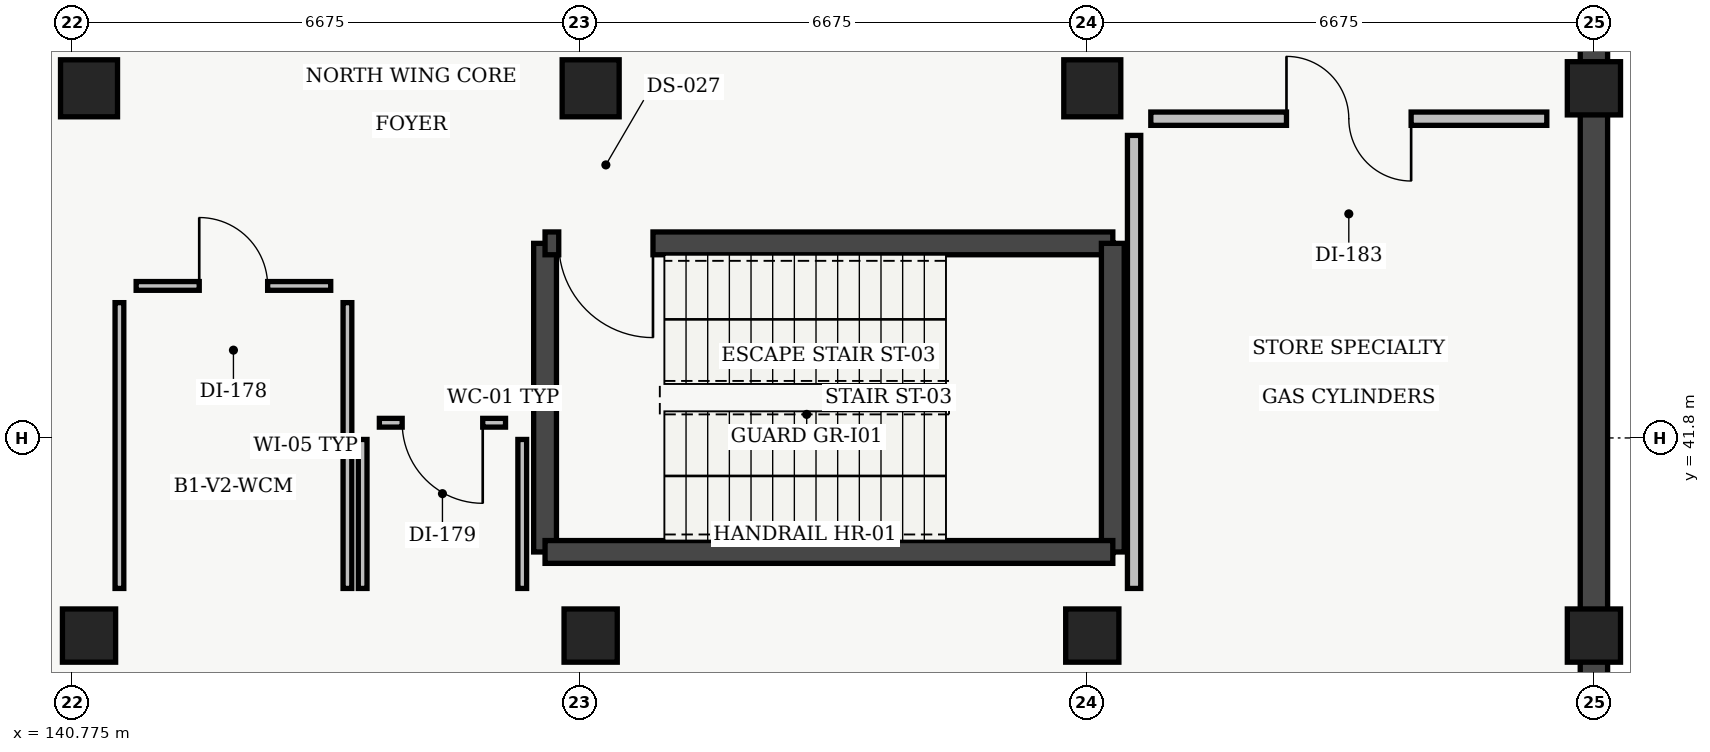
"""IFC4 building model, lengths in metres.
Left out: names, types, materials, properties, quantities, classifications, styles, units other than length and angle.
Written with IfcOpenShell. Run it as: python <this file> out.ifc"""

import sys

from ifc_helpers import new_model, si_unit, direction, frame, frame_2d, origin, origin_2d, place, context, subcontext, project, spatial, rectangle, extrude, element, fill, save


model = new_model("IFC4")
c1 = context("Model", 3, precision=1e-05, world=origin(), true_north=direction((0.0, 1.0)))
c2 = subcontext(c1, "Body", "Model", "MODEL_VIEW")
j1 = project(units=[si_unit("LENGTHUNIT", "METRE"), si_unit("PLANEANGLEUNIT", "RADIAN")], contexts=[c1])
p1 = place(None, origin())
s1 = spatial("IfcSite", under=j1, at=p1, CompositionType="ELEMENT")
p2 = place(p1, origin())
s2 = spatial("IfcBuilding", under=s1, at=p2, CompositionType="ELEMENT")
p3 = place(p2, frame((0.0, 0.0, -4.8)))
s3 = spatial("IfcBuildingStorey", under=s2, at=p3, CompositionType="ELEMENT", Elevation=-4.8)
p4 = place(p3, frame((141.0, 39.2, 0.0), z_axis=(0.0, 0.0, 1.0), x_axis=(1.0, 0.0, 0.0)))
e1 = element("IfcColumn", 1, at=p4, inside=s3, PredefinedType="COLUMN", context=c2, shape_type="SweptSolid", body=[
    extrude(rectangle(XDim=0.7, YDim=0.7, at=origin_2d()), origin(), (0.0, 0.0, 1.0), 4.59),
])
p5 = place(p3, frame((141.0, 46.4, 0.0), z_axis=(0.0, 0.0, 1.0), x_axis=(1.0, 0.0, 0.0)))
e2 = element("IfcColumn", 2, at=p5, inside=s3, PredefinedType="COLUMN", context=c2, shape_type="SweptSolid", body=[
    extrude(rectangle(XDim=0.75, YDim=0.75, at=origin_2d()), origin(), (0.0, 0.0, 1.0), 4.59),
])
p6 = place(p3, frame((147.6, 39.2, 0.0), z_axis=(0.0, 0.0, 1.0), x_axis=(1.0, 0.0, 0.0)))
e3 = element("IfcColumn", 3, at=p6, inside=s3, PredefinedType="COLUMN", context=c2, shape_type="SweptSolid", body=[
    extrude(rectangle(XDim=0.7, YDim=0.7, at=origin_2d()), origin(), (0.0, 0.0, 1.0), 4.59),
])
p7 = place(p3, frame((147.6, 46.4, 0.0), z_axis=(0.0, 0.0, 1.0), x_axis=(1.0, 0.0, 0.0)))
e4 = element("IfcColumn", 4, at=p7, inside=s3, PredefinedType="COLUMN", context=c2, shape_type="SweptSolid", body=[
    extrude(rectangle(XDim=0.75, YDim=0.75, at=origin_2d()), origin(), (0.0, 0.0, 1.0), 4.59),
])
p8 = place(p3, frame((154.2, 39.2, 0.0), z_axis=(0.0, 0.0, 1.0), x_axis=(1.0, 0.0, 0.0)))
e5 = element("IfcColumn", 5, at=p8, inside=s3, PredefinedType="COLUMN", context=c2, shape_type="SweptSolid", body=[
    extrude(rectangle(XDim=0.7, YDim=0.7, at=origin_2d()), origin(), (0.0, 0.0, 1.0), 4.59),
])
p9 = place(p3, frame((154.2, 46.4, 0.0), z_axis=(0.0, 0.0, 1.0), x_axis=(1.0, 0.0, 0.0)))
e6 = element("IfcColumn", 6, at=p9, inside=s3, PredefinedType="COLUMN", context=c2, shape_type="SweptSolid", body=[
    extrude(rectangle(XDim=0.75, YDim=0.75, at=origin_2d()), origin(), (0.0, 0.0, 1.0), 4.59),
])
for number, where, z_axis, x_axis in (
    (7, (160.8, 39.2, 0.0), (0.0, 0.0, 1.0), (1.0, 0.0, 0.0)),
    (8, (160.8, 46.4, 0.0), (0.0, 0.0, 1.0), (1.0, 0.0, 0.0)),
):
    element("IfcColumn", number, at=place(p3, frame(where, z_axis=z_axis, x_axis=x_axis)), inside=s3, PredefinedType="COLUMN", context=c2, shape_type="SweptSolid", body=[
        extrude(rectangle(XDim=0.7, YDim=0.7, at=origin_2d()), origin(), (0.0, 0.0, 1.0), 4.59),
    ])
p10 = place(p3, frame((160.8, 61.6, 0.0), z_axis=(0.0, 0.0, 1.0), x_axis=(0.0, -1.0, 0.0)))
e9 = element("IfcWall", 9, at=p10, inside=s3, PredefinedType="USERDEFINED", context=c2, shape_type="SweptSolid", body=[
    extrude(rectangle(XDim=61.4, YDim=0.36, at=frame_2d((30.7, 0.0))), origin(), (0.0, 0.0, 1.0), 4.58),
])
p11 = place(p3, frame((147.0, 40.3, 0.0), z_axis=(0.0, 0.0, 1.0), x_axis=(0.0, 1.0, 0.0)))
e10 = element("IfcWall", 10, at=p11, inside=s3, PredefinedType="SHEAR", context=c2, shape_type="SweptSolid", body=[
    extrude(rectangle(XDim=4.06, YDim=0.3, at=frame_2d((2.03, 0.0))), origin(), (0.0, 0.0, 1.0), 4.58),
])
p12 = place(p3, frame((147.0, 44.36, 0.0), z_axis=(0.0, 0.0, 1.0), x_axis=(1.0, 0.0, 0.0)))
e11 = element("IfcWall", 11, at=p12, inside=s3, PredefinedType="SHEAR", context=c2, shape_type="SweptSolid", body=[
    extrude(rectangle(XDim=7.47, YDim=0.3, at=frame_2d((3.735, 0.0))), origin(), (0.0, 0.0, 1.0), 4.58),
])
p13 = place(p12, frame((0.18, 0.0, 0.0)))
e12 = element("IfcOpeningElement", 12, at=p13, cuts=e11, PredefinedType="OPENING", context=c2, shape_type="SweptSolid", body=[
    extrude(rectangle(XDim=1.24, YDim=2.15, at=frame_2d((0.62, 1.075))), frame((0.0, 0.15, 0.0), z_axis=(0.0, -1.0, 0.0), x_axis=(1.0, 0.0, 0.0)), (0.0, 0.0, 1.0), 0.3),
])
p14 = place(p3, frame((154.47, 44.36, 0.0), z_axis=(0.0, 0.0, 1.0), x_axis=(0.0, -1.0, 0.0)))
e13 = element("IfcWall", 13, at=p14, inside=s3, PredefinedType="SHEAR", context=c2, shape_type="SweptSolid", body=[
    extrude(rectangle(XDim=4.06, YDim=0.3, at=frame_2d((2.03, 0.0))), origin(), (0.0, 0.0, 1.0), 4.58),
])
p15 = place(p3, frame((154.47, 40.3, 0.0), z_axis=(0.0, 0.0, 1.0), x_axis=(-1.0, 0.0, 0.0)))
e14 = element("IfcWall", 14, at=p15, inside=s3, PredefinedType="SHEAR", context=c2, shape_type="SweptSolid", body=[
    extrude(rectangle(XDim=7.47, YDim=0.3, at=frame_2d((3.735, 0.0))), origin(), (0.0, 0.0, 1.0), 4.58),
])
p16 = place(p3, frame((144.4, 39.82, 0.0), z_axis=(0.0, 0.0, 1.0), x_axis=(0.0, 1.0, 0.0)))
e15 = element("IfcWall", 15, at=p16, inside=s3, PredefinedType="PARTITIONING", context=c2, shape_type="SweptSolid", body=[
    extrude(rectangle(XDim=3.76, YDim=0.115, at=frame_2d((1.88, 0.0))), origin(), (0.0, 0.0, 1.0), 4.25),
])
p17 = place(p3, frame((144.18, 43.8, 0.0), z_axis=(0.0, 0.0, 1.0), x_axis=(-1.0, 0.0, 0.0)))
e16 = element("IfcWall", 16, at=p17, inside=s3, PredefinedType="PARTITIONING", context=c2, shape_type="SweptSolid", body=[
    extrude(rectangle(XDim=2.56, YDim=0.115, at=frame_2d((1.28, 0.0))), origin(), (0.0, 0.0, 1.0), 4.25),
])
p18 = place(p17, frame((0.83, 0.0, 0.0)))
e17 = element("IfcOpeningElement", 17, at=p18, cuts=e16, PredefinedType="OPENING", context=c2, shape_type="SweptSolid", body=[
    extrude(rectangle(XDim=0.9, YDim=2.1, at=frame_2d((0.45, 1.05))), frame((0.0, 0.058, 0.0), z_axis=(0.0, -1.0, 0.0), x_axis=(1.0, 0.0, 0.0)), (0.0, 0.0, 1.0), 0.115),
])
p19 = place(p3, frame((141.4, 43.58, 0.0), z_axis=(0.0, 0.0, 1.0), x_axis=(0.0, -1.0, 0.0)))
e18 = element("IfcWall", 18, at=p19, inside=s3, PredefinedType="PARTITIONING", context=c2, shape_type="SweptSolid", body=[
    extrude(rectangle(XDim=3.76, YDim=0.115, at=frame_2d((1.88, 0.0))), origin(), (0.0, 0.0, 1.0), 4.25),
])
p20 = place(p3, frame((146.7, 39.82, 0.0), z_axis=(0.0, 0.0, 1.0), x_axis=(0.0, 1.0, 0.0)))
e19 = element("IfcWall", 19, at=p20, inside=s3, PredefinedType="PARTITIONING", context=c2, shape_type="SweptSolid", body=[
    extrude(rectangle(XDim=1.96, YDim=0.115, at=frame_2d((0.98, 0.0))), origin(), (0.0, 0.0, 1.0), 4.25),
])
p21 = place(p3, frame((146.48, 42.0, 0.0), z_axis=(0.0, 0.0, 1.0), x_axis=(-1.0, 0.0, 0.0)))
e20 = element("IfcWall", 20, at=p21, inside=s3, PredefinedType="PARTITIONING", context=c2, shape_type="SweptSolid", body=[
    extrude(rectangle(XDim=1.66, YDim=0.115, at=frame_2d((0.83, 0.0))), origin(), (0.0, 0.0, 1.0), 4.25),
])
p22 = place(p21, frame((0.3, 0.0, 0.0)))
e21 = element("IfcOpeningElement", 21, at=p22, cuts=e20, PredefinedType="OPENING", context=c2, shape_type="SweptSolid", body=[
    extrude(rectangle(XDim=1.06, YDim=2.12, at=frame_2d((0.53, 1.06))), frame((0.0, 0.058, 0.0), z_axis=(0.0, -1.0, 0.0), x_axis=(1.0, 0.0, 0.0)), (0.0, 0.0, 1.0), 0.115),
])
p23 = place(p3, frame((144.6, 41.78, 0.0), z_axis=(0.0, 0.0, 1.0), x_axis=(0.0, -1.0, 0.0)))
e22 = element("IfcWall", 22, at=p23, inside=s3, PredefinedType="PARTITIONING", context=c2, shape_type="SweptSolid", body=[
    extrude(rectangle(XDim=1.96, YDim=0.115, at=frame_2d((0.98, 0.0))), origin(), (0.0, 0.0, 1.0), 4.25),
])
p24 = place(p3, frame((160.18, 46.0, 0.0), z_axis=(0.0, 0.0, 1.0), x_axis=(-1.0, 0.0, 0.0)))
e23 = element("IfcWall", 23, at=p24, inside=s3, PredefinedType="SOLIDWALL", context=c2, shape_type="SweptSolid", body=[
    extrude(rectangle(XDim=5.21, YDim=0.175, at=frame_2d((2.605, 0.0))), origin(), (0.0, 0.0, 1.0), 4.25),
])
p25 = place(p24, frame((1.785, 0.0, 0.0)))
e24 = element("IfcOpeningElement", 24, at=p25, cuts=e23, PredefinedType="OPENING", context=c2, shape_type="SweptSolid", body=[
    extrude(rectangle(XDim=1.64, YDim=2.2, at=frame_2d((0.82, 1.1))), frame((0.0, 0.087, 0.0), z_axis=(0.0, -1.0, 0.0), x_axis=(1.0, 0.0, 0.0)), (0.0, 0.0, 1.0), 0.175),
])
p26 = place(p3, frame((154.75, 45.78, 0.0), z_axis=(0.0, 0.0, 1.0), x_axis=(0.0, -1.0, 0.0)))
e25 = element("IfcWall", 25, at=p26, inside=s3, PredefinedType="SOLIDWALL", context=c2, shape_type="SweptSolid", body=[
    extrude(rectangle(XDim=5.96, YDim=0.175, at=frame_2d((2.98, 0.0))), origin(), (0.0, 0.0, 1.0), 4.25),
])
p27 = place(p13, origin())
e26 = element("IfcDoor", 26, at=p27, inside=s3, OperationType="SINGLE_SWING_RIGHT", PredefinedType="DOOR", context=c2, shape_type="SweptSolid", body=[
    extrude(rectangle(XDim=1.24, YDim=2.15, at=frame_2d((0.62, 1.075))), frame((0.0, 0.025, 0.0), z_axis=(0.0, -1.0, 0.0), x_axis=(1.0, 0.0, 0.0)), (0.0, 0.0, 1.0), 0.05),
])
fill(e12, e26)
p28 = place(p18, origin())
e27 = element("IfcDoor", 27, at=p28, inside=s3, OperationType="SINGLE_SWING_RIGHT", PredefinedType="DOOR", context=c2, shape_type="SweptSolid", body=[
    extrude(rectangle(XDim=0.9, YDim=2.1, at=frame_2d((0.45, 1.05))), frame((0.0, 0.025, 0.0), z_axis=(0.0, -1.0, 0.0), x_axis=(1.0, 0.0, 0.0)), (0.0, 0.0, 1.0), 0.05),
])
fill(e17, e27)
p29 = place(p22, origin())
e28 = element("IfcDoor", 28, at=p29, inside=s3, OperationType="SINGLE_SWING_LEFT", PredefinedType="DOOR", context=c2, shape_type="SweptSolid", body=[
    extrude(rectangle(XDim=1.06, YDim=2.12, at=frame_2d((0.53, 1.06))), frame((0.0, 0.025, 0.0), z_axis=(0.0, -1.0, 0.0), x_axis=(1.0, 0.0, 0.0)), (0.0, 0.0, 1.0), 0.05),
])
fill(e21, e28)
p30 = place(p25, origin())
e29 = element("IfcDoor", 29, at=p30, inside=s3, OperationType="DOUBLE_DOOR_SINGLE_SWING", PredefinedType="DOOR", context=c2, shape_type="SweptSolid", body=[
    extrude(rectangle(XDim=1.64, YDim=2.2, at=frame_2d((0.82, 1.1))), frame((0.0, 0.025, 0.0), z_axis=(0.0, -1.0, 0.0), x_axis=(1.0, 0.0, 0.0)), (0.0, 0.0, 1.0), 0.05),
])
fill(e24, e29)
save(model, sys.argv[1])
